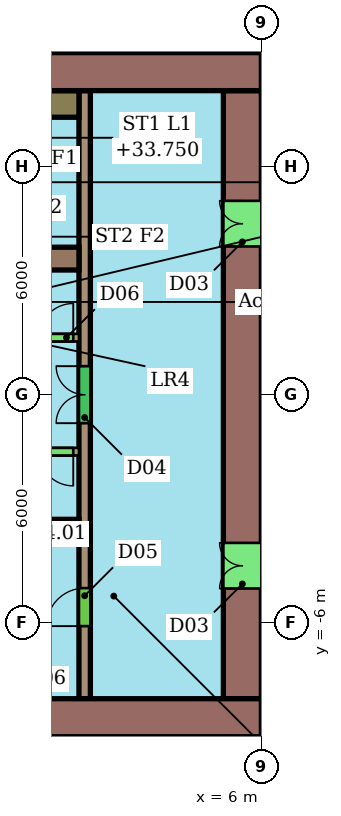
"""IFC4 building model, lengths in metres.
Left out: names, types, materials, properties, quantities, classifications, styles, units other than length and angle.
Written with IfcOpenShell. Run it as: python <this file> out.ifc"""

import sys

from ifc_helpers import new_model, si_unit, direction, frame, frame_2d, origin, place, context, subcontext, project, spatial, rectangle, extrude, element, fill, save


model = new_model("IFC4")
c1 = context("Model", 3, precision=1e-05, world=origin(), true_north=direction((0.0, 1.0)))
c2 = subcontext(c1, "Body", "Model", "MODEL_VIEW")
j1 = project(units=[si_unit("LENGTHUNIT", "METRE"), si_unit("PLANEANGLEUNIT", "RADIAN")], contexts=[c1])
p1 = place(None, origin())
s1 = spatial("IfcSite", under=j1, at=p1, CompositionType="ELEMENT")
p2 = place(p1, origin())
s2 = spatial("IfcBuilding", under=s1, at=p2, CompositionType="ELEMENT")
p3 = place(p2, frame((0.0, 0.0, 31.5)))
s3 = spatial("IfcBuildingStorey", under=s2, at=p3, CompositionType="ELEMENT", Elevation=31.5)
p4 = place(p3, frame((6.0, 8.5, 0.0), z_axis=(0.0, 0.0, 1.0), x_axis=(-1.0, 0.0, 0.0)))
e1 = element("IfcWall", 1, at=p4, inside=s3, PredefinedType="SHEAR", context=c2, shape_type="SweptSolid", body=[
    extrude(rectangle(XDim=12.0, YDim=1.0, at=frame_2d((6.0, 0.0))), origin(), (0.0, 0.0, 1.0), 4.2),
])
p5 = place(p4, frame((5.6, 0.0, 0.0)))
e2 = element("IfcOpeningElement", 2, at=p5, cuts=e1, PredefinedType="OPENING", context=c2, shape_type="SweptSolid", body=[
    extrude(rectangle(XDim=1.2, YDim=2.1, at=frame_2d((0.6, 1.05))), frame((0.0, 0.51, 0.0), z_axis=(0.0, -1.0, 0.0), x_axis=(1.0, 0.0, 0.0)), (0.0, 0.0, 1.0), 1.02),
])
p6 = place(p3, frame((-18.0, -8.5, 0.0), z_axis=(0.0, 0.0, 1.0), x_axis=(1.0, 0.0, 0.0)))
e3 = element("IfcWall", 3, at=p6, inside=s3, PredefinedType="SHEAR", context=c2, shape_type="SweptSolid", body=[
    extrude(rectangle(XDim=24.0, YDim=1.0, at=frame_2d((12.0, 0.0))), origin(), (0.0, 0.0, 1.0), 4.2),
])
p7 = place(p6, frame((6.0, 0.0, 0.0)))
e4 = element("IfcOpeningElement", 4, at=p7, cuts=e3, PredefinedType="OPENING", context=c2, shape_type="SweptSolid", body=[
    extrude(rectangle(XDim=1.2, YDim=2.1, at=frame_2d((0.6, 1.05))), frame((0.0, 0.51, 0.0), z_axis=(0.0, -1.0, 0.0), x_axis=(1.0, 0.0, 0.0)), (0.0, 0.0, 1.0), 1.02),
])
p8 = place(p3, frame((5.5, -8.0, 0.0), z_axis=(0.0, 0.0, 1.0), x_axis=(0.0, 1.0, 0.0)))
e5 = element("IfcWall", 5, at=p8, inside=s3, PredefinedType="SHEAR", context=c2, shape_type="SweptSolid", body=[
    extrude(rectangle(XDim=16.0, YDim=1.0, at=frame_2d((8.0, 0.0))), origin(), (0.0, 0.0, 1.0), 4.2),
])
p9 = place(p8, frame((2.9, 0.0, 0.0)))
e6 = element("IfcOpeningElement", 6, at=p9, cuts=e5, PredefinedType="OPENING", context=c2, shape_type="SweptSolid", body=[
    extrude(rectangle(XDim=1.2, YDim=2.1, at=frame_2d((0.6, 1.05))), frame((0.0, 0.51, 0.0), z_axis=(0.0, -1.0, 0.0), x_axis=(1.0, 0.0, 0.0)), (0.0, 0.0, 1.0), 1.02),
])
p10 = place(p8, frame((11.9, 0.0, 0.0)))
e7 = element("IfcOpeningElement", 7, at=p10, cuts=e5, PredefinedType="OPENING", context=c2, shape_type="SweptSolid", body=[
    extrude(rectangle(XDim=1.2, YDim=2.1, at=frame_2d((0.6, 1.05))), frame((0.0, 0.51, 0.0), z_axis=(0.0, -1.0, 0.0), x_axis=(1.0, 0.0, 0.0)), (0.0, 0.0, 1.0), 1.02),
])
for number, where, z_axis, x_axis in (
    (8, (-6.0, 3.58, 0.0), (0.0, 0.0, 1.0), (1.0, 0.0, 0.0)),
    (9, (-6.0, -3.58, 0.0), (0.0, 0.0, 1.0), (1.0, 0.0, 0.0)),
):
    element("IfcWall", number, at=place(p3, frame(where, z_axis=z_axis, x_axis=x_axis)), inside=s3, PredefinedType="SHEAR", context=c2, shape_type="SweptSolid", body=[
        extrude(rectangle(XDim=7.2, YDim=0.6, at=frame_2d((3.6, 0.0))), origin(), (0.0, 0.0, 1.0), 4.2),
    ])
p11 = place(p3, frame((1.35, -8.0, 0.0), z_axis=(0.0, 0.0, 1.0), x_axis=(0.0, 1.0, 0.0)))
e10 = element("IfcWall", 10, at=p11, inside=s3, PredefinedType="SHEAR", context=c2, shape_type="SweptSolid", body=[
    extrude(rectangle(XDim=16.0, YDim=0.3, at=frame_2d((8.0, 0.0))), origin(), (0.0, 0.0, 1.0), 4.2),
])
p12 = place(p11, frame((1.91, 0.0, 0.0)))
e11 = element("IfcOpeningElement", 11, at=p12, cuts=e10, PredefinedType="OPENING", context=c2, shape_type="SweptSolid", body=[
    extrude(rectangle(XDim=1.0, YDim=2.1, at=frame_2d((0.5, 1.05))), frame((0.0, 0.16, 0.0), z_axis=(0.0, -1.0, 0.0), x_axis=(1.0, 0.0, 0.0)), (0.0, 0.0, 1.0), 0.32),
])
p13 = place(p11, frame((7.25, 0.0, 0.0)))
e12 = element("IfcOpeningElement", 12, at=p13, cuts=e10, PredefinedType="OPENING", context=c2, shape_type="SweptSolid", body=[
    extrude(rectangle(XDim=1.5, YDim=2.1, at=frame_2d((0.75, 1.05))), frame((0.0, 0.16, 0.0), z_axis=(0.0, -1.0, 0.0), x_axis=(1.0, 0.0, 0.0)), (0.0, 0.0, 1.0), 0.32),
])
p14 = place(p3, frame((-13.2, 1.5, 0.0), z_axis=(0.0, 0.0, 1.0), x_axis=(1.0, 0.0, 0.0)))
e13 = element("IfcWall", 13, at=p14, inside=s3, PredefinedType="SHEAR", context=c2, shape_type="SweptSolid", body=[
    extrude(rectangle(XDim=14.4, YDim=0.2, at=frame_2d((7.2, 0.0))), origin(), (0.0, 0.0, 1.0), 4.2),
])
p15 = place(p14, frame((0.546, 0.0, 0.0)))
e14 = element("IfcOpeningElement", 14, at=p15, cuts=e13, PredefinedType="OPENING", context=c2, shape_type="SweptSolid", body=[
    extrude(rectangle(XDim=1.1, YDim=2.1, at=frame_2d((0.55, 1.05))), frame((0.0, 0.11, 0.0), z_axis=(0.0, -1.0, 0.0), x_axis=(1.0, 0.0, 0.0)), (0.0, 0.0, 1.0), 0.22),
])
p16 = place(p14, frame((2.988, 0.0, 0.0)))
e15 = element("IfcOpeningElement", 15, at=p16, cuts=e13, PredefinedType="OPENING", context=c2, shape_type="SweptSolid", body=[
    extrude(rectangle(XDim=1.1, YDim=2.1, at=frame_2d((0.55, 1.05))), frame((0.0, 0.11, 0.0), z_axis=(0.0, -1.0, 0.0), x_axis=(1.0, 0.0, 0.0)), (0.0, 0.0, 1.0), 0.22),
])
p17 = place(p14, frame((5.429, 0.0, 0.0)))
e16 = element("IfcOpeningElement", 16, at=p17, cuts=e13, PredefinedType="OPENING", context=c2, shape_type="SweptSolid", body=[
    extrude(rectangle(XDim=1.1, YDim=2.1, at=frame_2d((0.55, 1.05))), frame((0.0, 0.11, 0.0), z_axis=(0.0, -1.0, 0.0), x_axis=(1.0, 0.0, 0.0)), (0.0, 0.0, 1.0), 0.22),
])
p18 = place(p14, frame((7.871, 0.0, 0.0)))
e17 = element("IfcOpeningElement", 17, at=p18, cuts=e13, PredefinedType="OPENING", context=c2, shape_type="SweptSolid", body=[
    extrude(rectangle(XDim=1.1, YDim=2.1, at=frame_2d((0.55, 1.05))), frame((0.0, 0.11, 0.0), z_axis=(0.0, -1.0, 0.0), x_axis=(1.0, 0.0, 0.0)), (0.0, 0.0, 1.0), 0.22),
])
p19 = place(p14, frame((10.21, 0.0, 0.0)))
e18 = element("IfcOpeningElement", 18, at=p19, cuts=e13, PredefinedType="OPENING", context=c2, shape_type="SweptSolid", body=[
    extrude(rectangle(XDim=1.0, YDim=2.1, at=frame_2d((0.5, 1.05))), frame((0.0, 0.11, 0.0), z_axis=(0.0, -1.0, 0.0), x_axis=(1.0, 0.0, 0.0)), (0.0, 0.0, 1.0), 0.22),
])
p20 = place(p14, frame((13.35, 0.0, 0.0)))
e19 = element("IfcOpeningElement", 19, at=p20, cuts=e13, PredefinedType="OPENING", context=c2, shape_type="SweptSolid", body=[
    extrude(rectangle(XDim=0.9, YDim=2.1, at=frame_2d((0.45, 1.05))), frame((0.0, 0.11, 0.0), z_axis=(0.0, -1.0, 0.0), x_axis=(1.0, 0.0, 0.0)), (0.0, 0.0, 1.0), 0.22),
])
p21 = place(p3, frame((1.2, -1.5, 0.0), z_axis=(0.0, 0.0, 1.0), x_axis=(-1.0, 0.0, 0.0)))
e20 = element("IfcWall", 20, at=p21, inside=s3, PredefinedType="SHEAR", context=c2, shape_type="SweptSolid", body=[
    extrude(rectangle(XDim=14.4, YDim=0.2, at=frame_2d((7.2, 0.0))), origin(), (0.0, 0.0, 1.0), 4.2),
])
p22 = place(p21, frame((7.821, 0.0, 0.0)))
e21 = element("IfcOpeningElement", 21, at=p22, cuts=e20, PredefinedType="OPENING", context=c2, shape_type="SweptSolid", body=[
    extrude(rectangle(XDim=1.2, YDim=2.1, at=frame_2d((0.6, 1.05))), frame((0.0, 0.11, 0.0), z_axis=(0.0, -1.0, 0.0), x_axis=(1.0, 0.0, 0.0)), (0.0, 0.0, 1.0), 0.22),
])
p23 = place(p21, frame((0.15, 0.0, 0.0)))
e22 = element("IfcOpeningElement", 22, at=p23, cuts=e20, PredefinedType="OPENING", context=c2, shape_type="SweptSolid", body=[
    extrude(rectangle(XDim=0.9, YDim=2.1, at=frame_2d((0.45, 1.05))), frame((0.0, 0.11, 0.0), z_axis=(0.0, -1.0, 0.0), x_axis=(1.0, 0.0, 0.0)), (0.0, 0.0, 1.0), 0.22),
])
p24 = place(p3, frame((0.4, 7.65, 0.0), z_axis=(0.0, 0.0, 1.0), x_axis=(1.0, 0.0, 0.0)))
e23 = element("IfcWall", 23, at=p24, inside=s3, PredefinedType="SHEAR", context=c2, shape_type="SweptSolid", body=[
    extrude(rectangle(XDim=0.8, YDim=0.7, at=frame_2d((0.4, 0.0))), origin(), (0.0, 0.0, 1.0), 4.2),
])
p25 = place(p9, origin())
e24 = element("IfcDoor", 24, at=p25, inside=s3, OperationType="DOUBLE_DOOR_SINGLE_SWING", PredefinedType="NOTDEFINED", context=c2, shape_type="SweptSolid", body=[
    extrude(rectangle(XDim=1.2, YDim=2.1, at=frame_2d((0.6, 1.05))), frame((0.0, 0.025, 0.0), z_axis=(0.0, -1.0, 0.0), x_axis=(1.0, 0.0, 0.0)), (0.0, 0.0, 1.0), 0.05),
])
fill(e6, e24)
p26 = place(p10, origin())
e25 = element("IfcDoor", 25, at=p26, inside=s3, OperationType="DOUBLE_DOOR_SINGLE_SWING", PredefinedType="NOTDEFINED", context=c2, shape_type="SweptSolid", body=[
    extrude(rectangle(XDim=1.2, YDim=2.1, at=frame_2d((0.6, 1.05))), frame((0.0, 0.025, 0.0), z_axis=(0.0, -1.0, 0.0), x_axis=(1.0, 0.0, 0.0)), (0.0, 0.0, 1.0), 0.05),
])
fill(e7, e25)
p27 = place(p12, origin())
e26 = element("IfcDoor", 26, at=p27, inside=s3, OperationType="SINGLE_SWING_LEFT", PredefinedType="NOTDEFINED", context=c2, shape_type="SweptSolid", body=[
    extrude(rectangle(XDim=1.0, YDim=2.1, at=frame_2d((0.5, 1.05))), frame((0.0, 0.025, 0.0), z_axis=(0.0, -1.0, 0.0), x_axis=(1.0, 0.0, 0.0)), (0.0, 0.0, 1.0), 0.05),
])
fill(e11, e26)
p28 = place(p13, origin())
e27 = element("IfcDoor", 27, at=p28, inside=s3, OperationType="DOUBLE_DOOR_SINGLE_SWING", PredefinedType="NOTDEFINED", context=c2, shape_type="SweptSolid", body=[
    extrude(rectangle(XDim=1.5, YDim=2.1, at=frame_2d((0.75, 1.05))), frame((0.0, 0.025, 0.0), z_axis=(0.0, -1.0, 0.0), x_axis=(1.0, 0.0, 0.0)), (0.0, 0.0, 1.0), 0.05),
])
fill(e12, e27)
p29 = place(p20, origin())
e28 = element("IfcDoor", 28, at=p29, inside=s3, OperationType="SINGLE_SWING_RIGHT", PredefinedType="NOTDEFINED", context=c2, shape_type="SweptSolid", body=[
    extrude(rectangle(XDim=0.9, YDim=2.1, at=frame_2d((0.45, 1.05))), frame((0.0, 0.025, 0.0), z_axis=(0.0, -1.0, 0.0), x_axis=(1.0, 0.0, 0.0)), (0.0, 0.0, 1.0), 0.05),
])
fill(e19, e28)
p30 = place(p23, origin())
e29 = element("IfcDoor", 29, at=p30, inside=s3, OperationType="SINGLE_SWING_LEFT", PredefinedType="NOTDEFINED", context=c2, shape_type="SweptSolid", body=[
    extrude(rectangle(XDim=0.9, YDim=2.1, at=frame_2d((0.45, 1.05))), frame((0.0, 0.025, 0.0), z_axis=(0.0, -1.0, 0.0), x_axis=(1.0, 0.0, 0.0)), (0.0, 0.0, 1.0), 0.05),
])
fill(e22, e29)
save(model, sys.argv[1])
